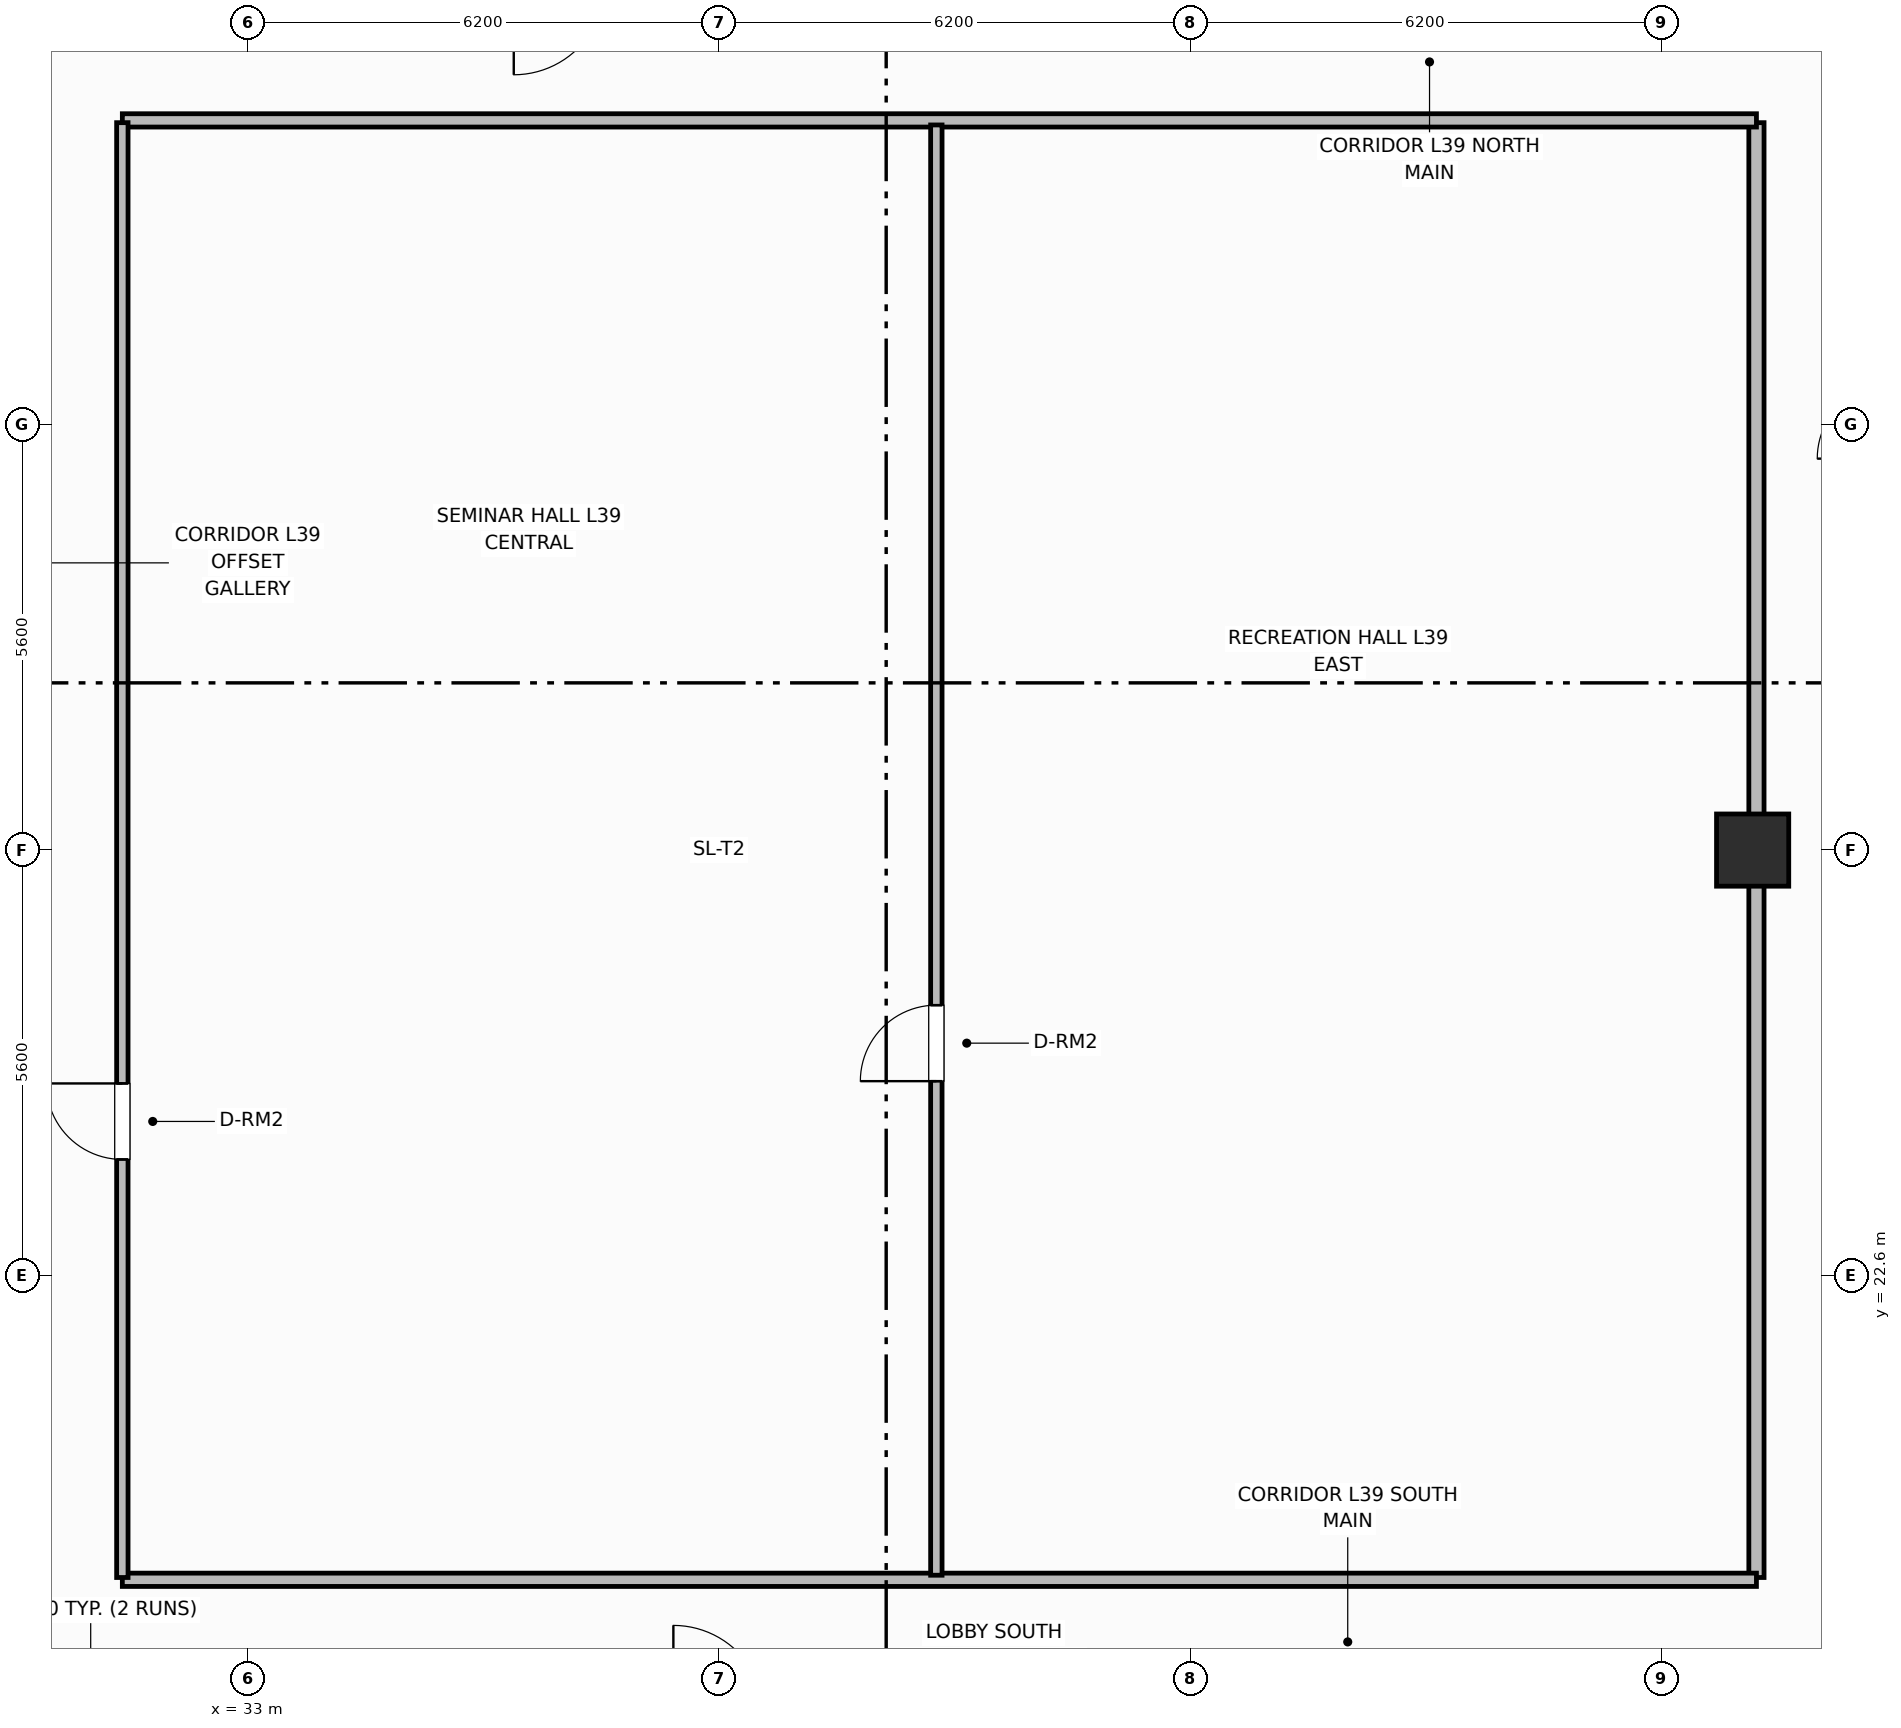
"""IFC4 building model, lengths in metres.
Left out: names, types, materials, properties, quantities, classifications, styles, units other than length and angle.
Written with IfcOpenShell. Run it as: python <this file> out.ifc"""

import sys

from ifc_helpers import new_model, si_unit, direction, frame, frame_2d, origin, origin_2d, place, context, subcontext, project, spatial, rectangle, extrude, element, fill, save


model = new_model("IFC4")
c1 = context("Model", 3, precision=1e-05, world=origin(), true_north=direction((0.0, 1.0)))
c2 = subcontext(c1, "Body", "Model", "MODEL_VIEW")
j1 = project(units=[si_unit("LENGTHUNIT", "METRE"), si_unit("PLANEANGLEUNIT", "RADIAN")], contexts=[c1])
p1 = place(None, origin())
s1 = spatial("IfcSite", under=j1, at=p1, CompositionType="ELEMENT")
p2 = place(p1, origin())
s2 = spatial("IfcBuilding", under=s1, at=p2, CompositionType="ELEMENT")
p3 = place(p2, frame((0.0, 0.0, 158.9)))
s3 = spatial("IfcBuildingStorey", under=s2, at=p3, CompositionType="ELEMENT", Elevation=158.9)
p4 = place(p3, frame((52.8, 28.2, 0.0), z_axis=(0.0, 0.0, 1.0), x_axis=(1.0, 0.0, 0.0)))
e1 = element("IfcColumn", 1, at=p4, inside=s3, PredefinedType="COLUMN", context=c2, shape_type="SweptSolid", body=[
    extrude(rectangle(XDim=0.95, YDim=0.95, at=origin_2d()), origin(), (0.0, 0.0, 1.0), 3.7),
])
p5 = place(p3, frame((52.85, 18.63, 0.0), z_axis=(0.0, 0.0, 1.0), x_axis=(0.0, 1.0, 0.0)))
e2 = element("IfcWall", 2, at=p5, inside=s3, PredefinedType="PARTITIONING", context=c2, shape_type="SweptSolid", body=[
    extrude(rectangle(XDim=19.14, YDim=0.2, at=frame_2d((9.57, 0.0))), origin(), (0.0, 0.0, 1.0), 2.55),
])
for number, where, z_axis, x_axis in (
    (3, (31.35, 18.6, 0.0), (0.0, 0.0, 1.0), (1.0, 0.0, 0.0)),
    (4, (31.35, 37.8, 0.0), (0.0, 0.0, 1.0), (1.0, 0.0, 0.0)),
):
    element("IfcWall", number, at=place(p3, frame(where, z_axis=z_axis, x_axis=x_axis)), inside=s3, PredefinedType="PARTITIONING", context=c2, shape_type="SweptSolid", body=[
        extrude(rectangle(XDim=21.5, YDim=0.175, at=frame_2d((10.75, 0.0))), origin(), (0.0, 0.0, 1.0), 2.55),
    ])
p6 = place(p3, frame((42.06, 18.66, 0.0), z_axis=(0.0, 0.0, 1.0), x_axis=(0.0, 1.0, 0.0)))
e5 = element("IfcWall", 5, at=p6, inside=s3, PredefinedType="PARTITIONING", context=c2, shape_type="SweptSolid", body=[
    extrude(rectangle(XDim=19.08, YDim=0.15, at=frame_2d((9.54, 0.0))), origin(), (0.0, 0.0, 1.0), 2.55),
])
p7 = place(p6, frame((6.5, 0.0, 0.0)))
e6 = element("IfcOpeningElement", 6, at=p7, cuts=e5, PredefinedType="OPENING", context=c2, shape_type="SweptSolid", body=[
    extrude(rectangle(XDim=1.0, YDim=2.15, at=frame_2d((0.5, 1.075))), frame((0.0, 0.085, 0.0), z_axis=(0.0, -1.0, 0.0), x_axis=(1.0, 0.0, 0.0)), (0.0, 0.0, 1.0), 0.17),
])
p8 = place(p3, frame((31.35, 18.63, 0.0), z_axis=(0.0, 0.0, 1.0), x_axis=(0.0, 1.0, 0.0)))
e7 = element("IfcWall", 7, at=p8, inside=s3, PredefinedType="PARTITIONING", context=c2, shape_type="SweptSolid", body=[
    extrude(rectangle(XDim=19.14, YDim=0.15, at=frame_2d((9.57, 0.0))), origin(), (0.0, 0.0, 1.0), 2.55),
])
p9 = place(p8, frame((5.5, 0.0, 0.0)))
e8 = element("IfcOpeningElement", 8, at=p9, cuts=e7, PredefinedType="OPENING", context=c2, shape_type="SweptSolid", body=[
    extrude(rectangle(XDim=1.0, YDim=2.15, at=frame_2d((0.5, 1.075))), frame((0.0, 0.085, 0.0), z_axis=(0.0, -1.0, 0.0), x_axis=(1.0, 0.0, 0.0)), (0.0, 0.0, 1.0), 0.17),
])
p10 = place(p7, origin())
e9 = element("IfcDoor", 9, at=p10, inside=s3, OperationType="SINGLE_SWING_LEFT", PredefinedType="DOOR", context=c2, shape_type="SweptSolid", body=[
    extrude(rectangle(XDim=1.0, YDim=2.15, at=frame_2d((0.5, 1.075))), frame((0.0, 0.025, 0.0), z_axis=(0.0, -1.0, 0.0), x_axis=(1.0, 0.0, 0.0)), (0.0, 0.0, 1.0), 0.05),
])
fill(e6, e9)
p11 = place(p9, origin())
e10 = element("IfcDoor", 10, at=p11, inside=s3, OperationType="SINGLE_SWING_RIGHT", PredefinedType="DOOR", context=c2, shape_type="SweptSolid", body=[
    extrude(rectangle(XDim=1.0, YDim=2.15, at=frame_2d((0.5, 1.075))), frame((0.0, 0.025, 0.0), z_axis=(0.0, -1.0, 0.0), x_axis=(1.0, 0.0, 0.0)), (0.0, 0.0, 1.0), 0.05),
])
fill(e8, e10)
save(model, sys.argv[1])
